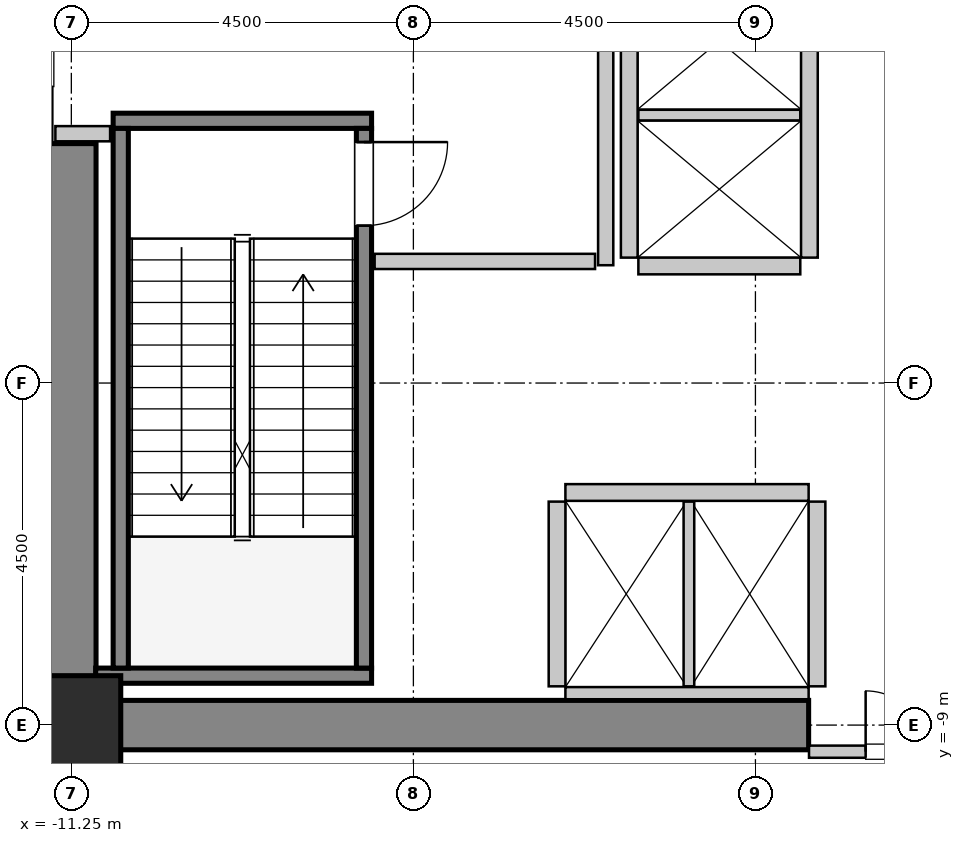
"""IFC4 building model, lengths in metres.
Left out: names, types, materials, properties, quantities, classifications, styles, units other than length and angle.
Written with IfcOpenShell. Run it as: python <this file> out.ifc"""

import sys

from ifc_helpers import new_model, si_unit, direction, frame, frame_2d, origin, origin_2d, place, context, subcontext, project, spatial, rectangle, hollow_rectangle, extrude, source, transform, mapped, element, fill, save


model = new_model("IFC4")
c1 = context("Model", 3, precision=1e-05, world=origin(), true_north=direction((0.0, 1.0)))
c2 = subcontext(c1, "Body", "Model", "MODEL_VIEW")
j1 = project(units=[si_unit("LENGTHUNIT", "METRE"), si_unit("PLANEANGLEUNIT", "RADIAN")], contexts=[c1])
p1 = place(None, origin())
s1 = spatial("IfcSite", under=j1, at=p1, CompositionType="ELEMENT")
p2 = place(p1, origin())
s2 = spatial("IfcBuilding", under=s1, at=p2, CompositionType="ELEMENT")
p3 = place(p2, frame((0.0, 0.0, 16.8)))
s3 = spatial("IfcBuildingStorey", under=s2, at=p3, CompositionType="ELEMENT", Elevation=16.8)
m1 = source(origin(), c2, "Body", "SweptSolid", [
    extrude(rectangle(XDim=10.025, YDim=0.65, at=frame_2d((5.012, 0.0))), origin(), (0.0, 0.0, 1.0), 5.4),
])
p4 = place(p3, frame((-11.575, -9.0, 0.0), z_axis=(0.0, 0.0, 1.0), x_axis=(1.0, 0.0, 0.0)))
e1 = element("IfcWall", 1, at=p4, inside=s3, PredefinedType="SHEAR", context=c2, shape_type="MappedRepresentation", body=[
    mapped(m1, transform((0.0, 0.0, 0.0), x_axis=(1.0, 0.0, 0.0), y_axis=(0.0, 1.0, 0.0), z_axis=(0.0, 0.0, 1.0), scale=1.0)),
])
m2 = source(origin(), c2, "Body", "SweptSolid", [
    extrude(rectangle(XDim=7.325, YDim=0.65, at=frame_2d((3.663, 0.0))), origin(), (0.0, 0.0, 1.0), 5.4),
])
p5 = place(p3, frame((-11.25, -8.675, 0.0), z_axis=(0.0, 0.0, 1.0), x_axis=(0.0, 1.0, 0.0)))
e2 = element("IfcWall", 2, at=p5, inside=s3, PredefinedType="SHEAR", context=c2, shape_type="MappedRepresentation", body=[
    mapped(m2, transform((0.0, 0.0, 0.0), x_axis=(1.0, 0.0, 0.0), y_axis=(0.0, 1.0, 0.0), z_axis=(0.0, 0.0, 1.0), scale=1.0)),
])
m3 = source(origin(), c2, "Body", "SweptSolid", [
    extrude(hollow_rectangle(XDim=1.3, YDim=1.3, WallThickness=0.065, InnerFilletRadius=0.065, OuterFilletRadius=0.13, at=origin_2d()), origin(), (0.0, 0.0, 1.0), 5.4),
])
p6 = place(p3, frame((-11.25, -9.0, 0.0), z_axis=(0.0, 0.0, 1.0), x_axis=(1.0, 0.0, 0.0)))
e3 = element("IfcColumn", 3, at=p6, inside=s3, PredefinedType="COLUMN", context=c2, shape_type="MappedRepresentation", body=[
    mapped(m3, transform((0.0, 0.0, 0.0), x_axis=(1.0, 0.0, 0.0), y_axis=(0.0, 1.0, 0.0), z_axis=(0.0, 0.0, 1.0), scale=1.0)),
])
m4 = source(origin(), c2, "Body", "SweptSolid", [
    extrude(rectangle(XDim=3.4, YDim=0.2, at=frame_2d((1.7, 0.0))), origin(), (0.0, 0.0, 1.0), 5.4),
])
p7 = place(p3, frame((-10.7, -1.05, 0.0), z_axis=(0.0, 0.0, 1.0), x_axis=(1.0, 0.0, 0.0)))
e4 = element("IfcWall", 4, at=p7, inside=s3, PredefinedType="SOLIDWALL", context=c2, shape_type="MappedRepresentation", body=[
    mapped(m4, transform((0.0, 0.0, 0.0), x_axis=(1.0, 0.0, 0.0), y_axis=(0.0, 1.0, 0.0), z_axis=(0.0, 0.0, 1.0), scale=1.0)),
])
m5 = source(origin(), c2, "Body", "SweptSolid", [
    extrude(rectangle(XDim=3.63, YDim=0.2, at=frame_2d((1.815, 0.0))), origin(), (0.0, 0.0, 1.0), 5.4),
])
p8 = place(p3, frame((-10.93, -8.35, 0.0), z_axis=(0.0, 0.0, 1.0), x_axis=(1.0, 0.0, 0.0)))
e5 = element("IfcWall", 5, at=p8, inside=s3, PredefinedType="SOLIDWALL", context=c2, shape_type="MappedRepresentation", body=[
    mapped(m5, transform((0.0, 0.0, 0.0), x_axis=(1.0, 0.0, 0.0), y_axis=(0.0, 1.0, 0.0), z_axis=(0.0, 0.0, 1.0), scale=1.0)),
])
m6 = source(origin(), c2, "Body", "SweptSolid", [
    extrude(rectangle(XDim=7.1, YDim=0.2, at=frame_2d((3.55, 0.0))), origin(), (0.0, 0.0, 1.0), 5.4),
])
p9 = place(p3, frame((-10.6, -1.15, 0.0), z_axis=(0.0, 0.0, 1.0), x_axis=(0.0, -1.0, 0.0)))
e6 = element("IfcWall", 6, at=p9, inside=s3, PredefinedType="SOLIDWALL", context=c2, shape_type="MappedRepresentation", body=[
    mapped(m6, transform((0.0, 0.0, 0.0), x_axis=(1.0, 0.0, 0.0), y_axis=(0.0, 1.0, 0.0), z_axis=(0.0, 0.0, 1.0), scale=1.0)),
])
p10 = place(p3, frame((-7.4, -1.15, 0.0), z_axis=(0.0, 0.0, 1.0), x_axis=(0.0, -1.0, 0.0)))
e7 = element("IfcWall", 7, at=p10, inside=s3, PredefinedType="SOLIDWALL", context=c2, shape_type="MappedRepresentation", body=[
    mapped(m6, transform((0.0, 0.0, 0.0), x_axis=(1.0, 0.0, 0.0), y_axis=(0.0, 1.0, 0.0), z_axis=(0.0, 0.0, 1.0), scale=1.0)),
])
p11 = place(p10, frame((0.18, 0.0, 0.0)))
e8 = element("IfcOpeningElement", 8, at=p11, cuts=e7, PredefinedType="OPENING", context=c2, shape_type="SweptSolid", body=[
    extrude(rectangle(XDim=1.1, YDim=2.15, at=frame_2d((0.55, 1.075))), frame((0.0, 0.11, 0.0), z_axis=(0.0, -1.0, 0.0), x_axis=(1.0, 0.0, 0.0)), (0.0, 0.0, 1.0), 0.22),
])
m7 = source(origin(), c2, "Body", "SweptSolid", [
    extrude(rectangle(XDim=3.2, YDim=0.22, at=frame_2d((1.6, 0.0))), origin(), (0.0, 0.0, 1.0), 5.085),
])
p12 = place(p3, frame((-1.55, -5.94, 0.0), z_axis=(0.0, 0.0, 1.0), x_axis=(-1.0, 0.0, 0.0)))
e9 = element("IfcWall", 9, at=p12, inside=s3, PredefinedType="SOLIDWALL", context=c2, shape_type="MappedRepresentation", body=[
    mapped(m7, transform((0.0, 0.0, 0.0), x_axis=(1.0, 0.0, 0.0), y_axis=(0.0, 1.0, 0.0), z_axis=(0.0, 0.0, 1.0), scale=1.0)),
])
m8 = source(origin(), c2, "Body", "SweptSolid", [
    extrude(rectangle(XDim=3.2, YDim=0.16, at=frame_2d((1.6, 0.0))), origin(), (0.0, 0.0, 1.0), 3.975),
])
p13 = place(p3, frame((-4.75, -8.58, 0.0), z_axis=(0.0, 0.0, 1.0), x_axis=(1.0, 0.0, 0.0)))
e10 = element("IfcWall", 10, at=p13, inside=s3, PredefinedType="PARTITIONING", context=c2, shape_type="MappedRepresentation", body=[
    mapped(m8, transform((0.0, 0.0, 0.0), x_axis=(1.0, 0.0, 0.0), y_axis=(0.0, 1.0, 0.0), z_axis=(0.0, 0.0, 1.0), scale=1.0)),
])
m9 = source(origin(), c2, "Body", "SweptSolid", [
    extrude(rectangle(XDim=2.43, YDim=0.22, at=frame_2d((1.215, 0.0))), origin(), (0.0, 0.0, 1.0), 5.085),
])
p14 = place(p3, frame((-4.86, -6.06, 0.0), z_axis=(0.0, 0.0, 1.0), x_axis=(0.0, -1.0, 0.0)))
e11 = element("IfcWall", 11, at=p14, inside=s3, PredefinedType="SOLIDWALL", context=c2, shape_type="MappedRepresentation", body=[
    mapped(m9, transform((0.0, 0.0, 0.0), x_axis=(1.0, 0.0, 0.0), y_axis=(0.0, 1.0, 0.0), z_axis=(0.0, 0.0, 1.0), scale=1.0)),
])
m10 = source(origin(), c2, "Body", "SweptSolid", [
    extrude(rectangle(XDim=2.43, YDim=0.14, at=frame_2d((1.215, 0.0))), origin(), (0.0, 0.0, 1.0), 5.085),
])
p15 = place(p3, frame((-3.125, -8.49, 0.0), z_axis=(0.0, 0.0, 1.0), x_axis=(0.0, 1.0, 0.0)))
e12 = element("IfcWall", 12, at=p15, inside=s3, PredefinedType="PARTITIONING", context=c2, shape_type="MappedRepresentation", body=[
    mapped(m10, transform((0.0, 0.0, 0.0), x_axis=(1.0, 0.0, 0.0), y_axis=(0.0, 1.0, 0.0), z_axis=(0.0, 0.0, 1.0), scale=1.0)),
])
p16 = place(p3, frame((-1.44, -8.49, 0.0), z_axis=(0.0, 0.0, 1.0), x_axis=(0.0, 1.0, 0.0)))
e13 = element("IfcWall", 13, at=p16, inside=s3, PredefinedType="SOLIDWALL", context=c2, shape_type="MappedRepresentation", body=[
    mapped(m9, transform((0.0, 0.0, 0.0), x_axis=(1.0, 0.0, 0.0), y_axis=(0.0, 1.0, 0.0), z_axis=(0.0, 0.0, 1.0), scale=1.0)),
])
m11 = source(origin(), c2, "Body", "SweptSolid", [
    extrude(rectangle(XDim=5.7, YDim=0.22, at=frame_2d((2.85, 0.0))), origin(), (0.0, 0.0, 1.0), 5.085),
])
for number, where, z_axis, x_axis in (
    (14, (-1.54, -2.85, 0.0), (0.0, 0.0, 1.0), (0.0, 1.0, 0.0)),
    (15, (-3.91, 2.85, 0.0), (0.0, 0.0, 1.0), (0.0, -1.0, 0.0)),
):
    element("IfcWall", number, at=place(p3, frame(where, z_axis=z_axis, x_axis=x_axis)), inside=s3, PredefinedType="SOLIDWALL", context=c2, shape_type="MappedRepresentation", body=[
        mapped(m11, transform((0.0, 0.0, 0.0), x_axis=(1.0, 0.0, 0.0), y_axis=(0.0, 1.0, 0.0), z_axis=(0.0, 0.0, 1.0), scale=1.0)),
    ])
m12 = source(origin(), c2, "Body", "SweptSolid", [
    extrude(rectangle(XDim=2.13, YDim=0.22, at=frame_2d((1.065, 0.0))), origin(), (0.0, 0.0, 1.0), 5.085),
])
p17 = place(p3, frame((-3.79, -2.96, 0.0), z_axis=(0.0, 0.0, 1.0), x_axis=(1.0, 0.0, 0.0)))
e16 = element("IfcWall", 16, at=p17, inside=s3, PredefinedType="SOLIDWALL", context=c2, shape_type="MappedRepresentation", body=[
    mapped(m12, transform((0.0, 0.0, 0.0), x_axis=(1.0, 0.0, 0.0), y_axis=(0.0, 1.0, 0.0), z_axis=(0.0, 0.0, 1.0), scale=1.0)),
])
m13 = source(origin(), c2, "Body", "SweptSolid", [
    extrude(rectangle(XDim=2.13, YDim=0.14, at=frame_2d((1.065, 0.0))), origin(), (0.0, 0.0, 1.0), 5.085),
])
p18 = place(p3, frame((-3.79, -0.975, 0.0), z_axis=(0.0, 0.0, 1.0), x_axis=(1.0, 0.0, 0.0)))
e17 = element("IfcWall", 17, at=p18, inside=s3, PredefinedType="PARTITIONING", context=c2, shape_type="MappedRepresentation", body=[
    mapped(m13, transform((0.0, 0.0, 0.0), x_axis=(1.0, 0.0, 0.0), y_axis=(0.0, 1.0, 0.0), z_axis=(0.0, 0.0, 1.0), scale=1.0)),
])
m14 = source(origin(), c2, "Body", "SweptSolid", [
    extrude(rectangle(XDim=5.9, YDim=0.2, at=frame_2d((2.95, 0.0))), origin(), (0.0, 0.0, 1.0), 5.085),
])
p19 = place(p3, frame((-4.22, -2.95, 0.0), z_axis=(0.0, 0.0, 1.0), x_axis=(0.0, 1.0, 0.0)))
e18 = element("IfcWall", 18, at=p19, inside=s3, PredefinedType="PARTITIONING", context=c2, shape_type="MappedRepresentation", body=[
    mapped(m14, transform((0.0, 0.0, 0.0), x_axis=(1.0, 0.0, 0.0), y_axis=(0.0, 1.0, 0.0), z_axis=(0.0, 0.0, 1.0), scale=1.0)),
])
m15 = source(origin(), c2, "Body", "SweptSolid", [
    extrude(rectangle(XDim=2.9, YDim=0.2, at=frame_2d((1.45, 0.0))), origin(), (0.0, 0.0, 1.0), 5.085),
])
p20 = place(p3, frame((-7.26, -2.9, 0.0), z_axis=(0.0, 0.0, 1.0), x_axis=(1.0, 0.0, 0.0)))
e19 = element("IfcWall", 19, at=p20, inside=s3, PredefinedType="PARTITIONING", context=c2, shape_type="MappedRepresentation", body=[
    mapped(m15, transform((0.0, 0.0, 0.0), x_axis=(1.0, 0.0, 0.0), y_axis=(0.0, 1.0, 0.0), z_axis=(0.0, 0.0, 1.0), scale=1.0)),
])
m16 = source(origin(), c2, "Body", "SweptSolid", [
    extrude(rectangle(XDim=0.72, YDim=0.2, at=frame_2d((0.36, 0.0))), origin(), (0.0, 0.0, 1.0), 5.085),
])
p21 = place(p3, frame((-11.46, -1.22, 0.0), z_axis=(0.0, 0.0, 1.0), x_axis=(1.0, 0.0, 0.0)))
e20 = element("IfcWall", 20, at=p21, inside=s3, PredefinedType="PARTITIONING", context=c2, shape_type="MappedRepresentation", body=[
    mapped(m16, transform((0.0, 0.0, 0.0), x_axis=(1.0, 0.0, 0.0), y_axis=(0.0, 1.0, 0.0), z_axis=(0.0, 0.0, 1.0), scale=1.0)),
])
m17 = source(origin(), c2, "Body", "SweptSolid", [
    extrude(rectangle(XDim=3.09, YDim=0.16, at=frame_2d((1.545, 0.0))), origin(), (0.0, 0.0, 1.0), 3.975),
])
p22 = place(p3, frame((-1.545, -9.35, 0.0), z_axis=(0.0, 0.0, 1.0), x_axis=(1.0, 0.0, 0.0)))
e21 = element("IfcWall", 21, at=p22, inside=s3, PredefinedType="PARTITIONING", context=c2, shape_type="MappedRepresentation", body=[
    mapped(m17, transform((0.0, 0.0, 0.0), x_axis=(1.0, 0.0, 0.0), y_axis=(0.0, 1.0, 0.0), z_axis=(0.0, 0.0, 1.0), scale=1.0)),
])
p23 = place(p22, frame((0.745, 0.0, 0.0)))
e22 = element("IfcOpeningElement", 22, at=p23, cuts=e21, PredefinedType="OPENING", context=c2, shape_type="SweptSolid", body=[
    extrude(rectangle(XDim=1.6, YDim=2.3, at=frame_2d((0.8, 1.15))), frame((0.0, 0.09, 0.0), z_axis=(0.0, -1.0, 0.0), x_axis=(1.0, 0.0, 0.0)), (0.0, 0.0, 1.0), 0.18),
])
m18 = source(origin(), c2, "Body", "SweptSolid", [
    extrude(rectangle(XDim=1.1, YDim=2.15, at=frame_2d((0.55, 1.075))), frame((0.0, 0.025, 0.0), z_axis=(0.0, -1.0, 0.0), x_axis=(1.0, 0.0, 0.0)), (0.0, 0.0, 1.0), 0.05),
])
p24 = place(p11, origin())
e23 = element("IfcDoor", 23, at=p24, inside=s3, OperationType="SINGLE_SWING_LEFT", PredefinedType="DOOR", context=c2, shape_type="MappedRepresentation", body=[
    mapped(m18, transform((0.0, 0.0, 0.0), x_axis=(1.0, 0.0, 0.0), y_axis=(0.0, 1.0, 0.0), z_axis=(0.0, 0.0, 1.0), scale=1.0)),
])
fill(e8, e23)
m19 = source(origin(), c2, "Body", "SweptSolid", [
    extrude(rectangle(XDim=1.6, YDim=2.3, at=frame_2d((0.8, 1.15))), frame((0.0, 0.025, 0.0), z_axis=(0.0, -1.0, 0.0), x_axis=(1.0, 0.0, 0.0)), (0.0, 0.0, 1.0), 0.05),
])
p25 = place(p23, origin())
e24 = element("IfcDoor", 24, at=p25, inside=s3, OperationType="DOUBLE_DOOR_SINGLE_SWING", PredefinedType="DOOR", context=c2, shape_type="MappedRepresentation", body=[
    mapped(m19, transform((0.0, 0.0, 0.0), x_axis=(1.0, 0.0, 0.0), y_axis=(0.0, 1.0, 0.0), z_axis=(0.0, 0.0, 1.0), scale=1.0)),
])
fill(e22, e24)
save(model, sys.argv[1])
